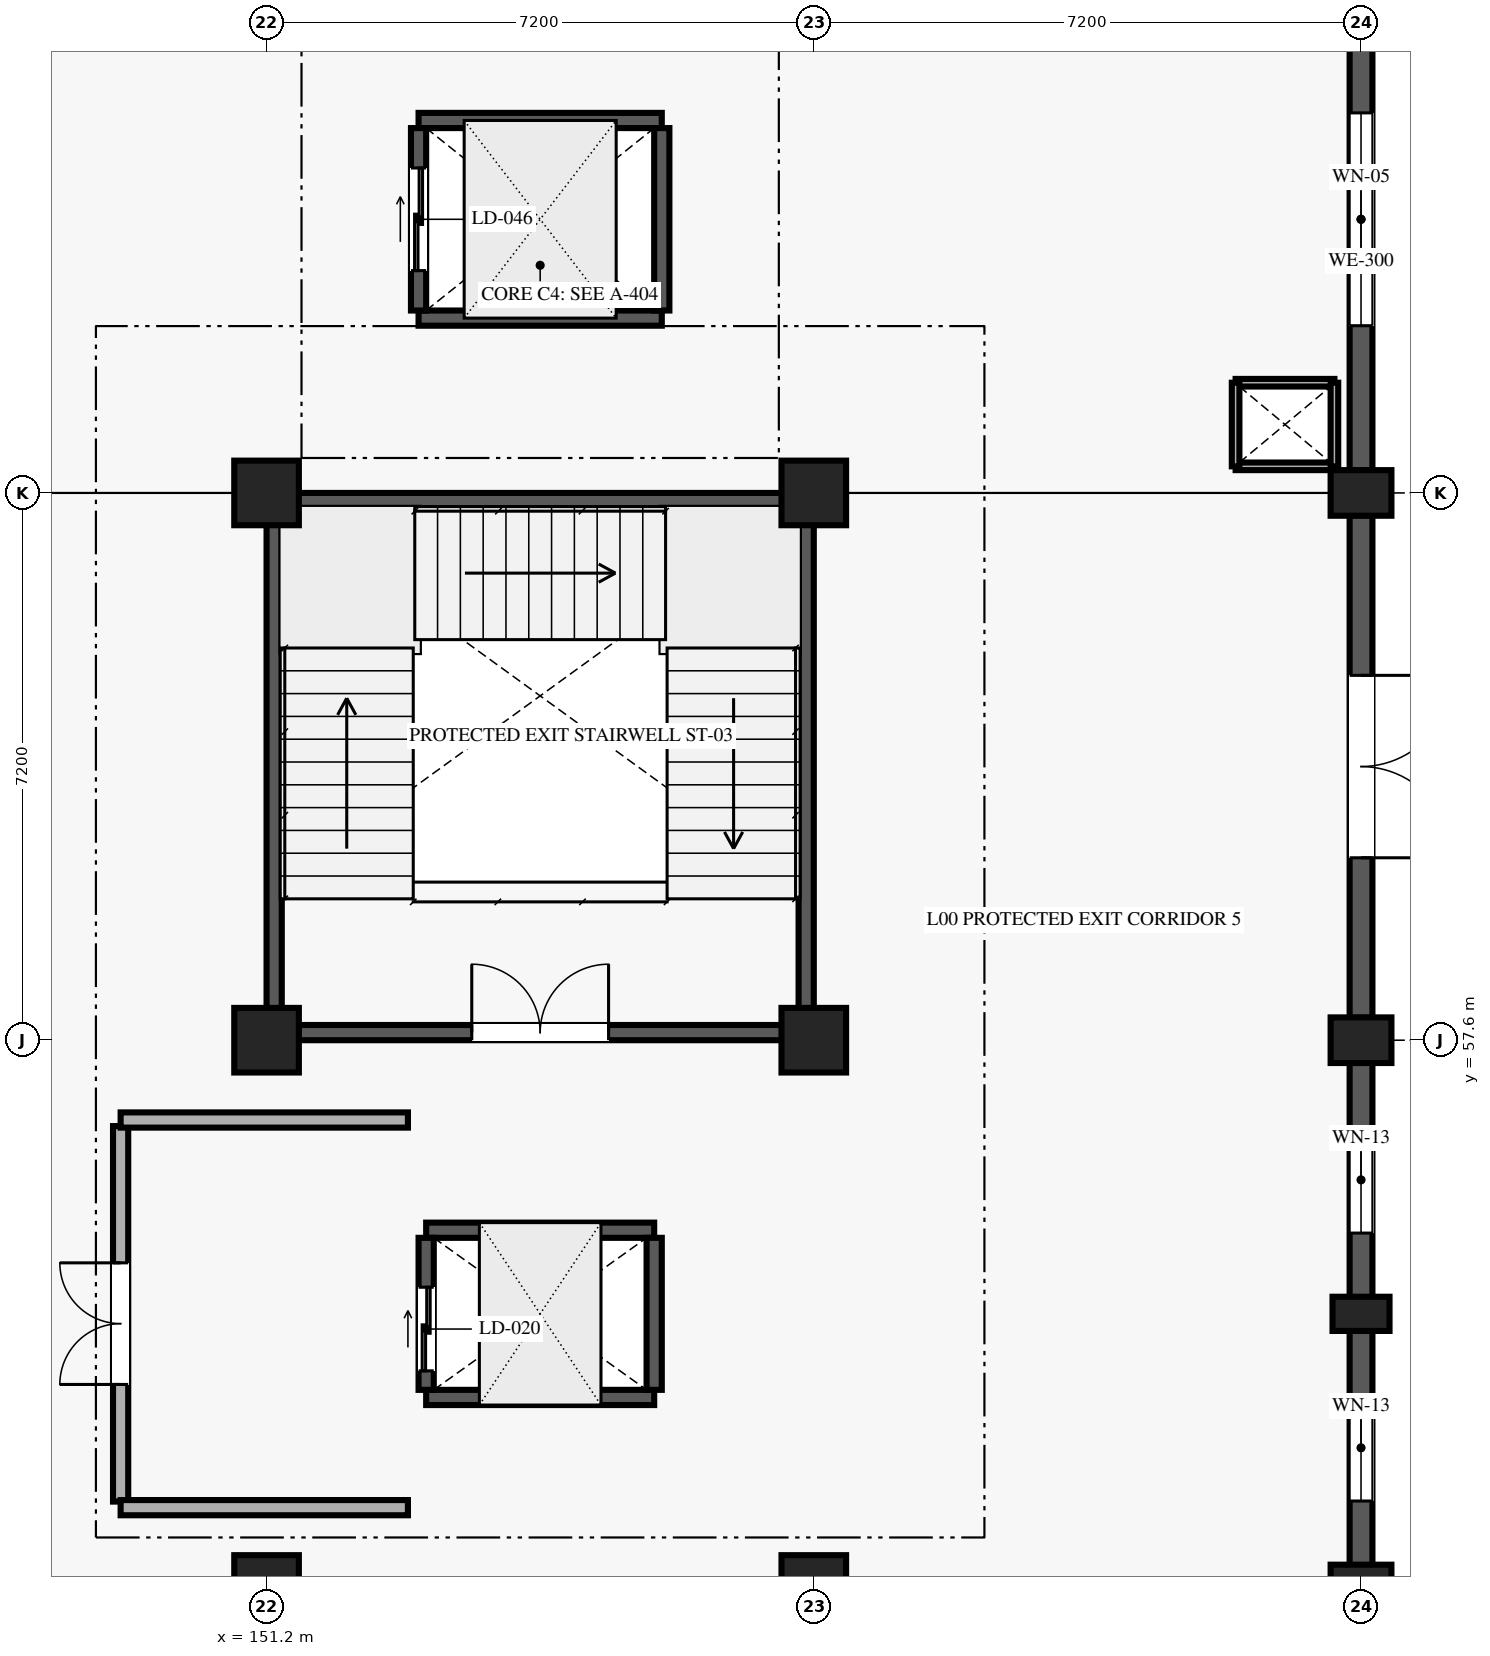
"""IFC4 building model, lengths in metres.
Left out: names, types, materials, properties, quantities, classifications, styles, units other than length and angle.
Written with IfcOpenShell. Run it as: python <this file> out.ifc"""

import sys

from ifc_helpers import new_model, si_unit, direction, frame, frame_2d, origin, origin_2d, place, context, subcontext, project, spatial, rectangle, extrude, element, fill, save


model = new_model("IFC4")
c1 = context("Model", 3, precision=1e-05, world=origin(), true_north=direction((0.0, 1.0)))
c2 = subcontext(c1, "Body", "Model", "MODEL_VIEW")
j1 = project(units=[si_unit("LENGTHUNIT", "METRE"), si_unit("PLANEANGLEUNIT", "RADIAN")], contexts=[c1])
p1 = place(None, origin())
s1 = spatial("IfcSite", under=j1, at=p1, CompositionType="ELEMENT")
p2 = place(p1, origin())
s2 = spatial("IfcBuilding", under=s1, at=p2, CompositionType="ELEMENT")
p3 = place(p2, origin())
s3 = spatial("IfcBuildingStorey", under=s2, at=p3, CompositionType="ELEMENT", Elevation=0.0)
for number, where, z_axis, x_axis in (
    (1, (151.2, 50.4, 0.0), (0.0, 0.0, 1.0), (1.0, 0.0, 0.0)),
    (2, (151.2, 57.6, 0.0), (0.0, 0.0, 1.0), (1.0, 0.0, 0.0)),
    (3, (151.2, 64.8, 0.0), (0.0, 0.0, 1.0), (1.0, 0.0, 0.0)),
    (4, (158.4, 50.4, 0.0), (0.0, 0.0, 1.0), (1.0, 0.0, 0.0)),
    (5, (158.4, 57.6, 0.0), (0.0, 0.0, 1.0), (1.0, 0.0, 0.0)),
    (6, (158.4, 64.8, 0.0), (0.0, 0.0, 1.0), (1.0, 0.0, 0.0)),
):
    element("IfcColumn", number, at=place(p3, frame(where, z_axis=z_axis, x_axis=x_axis)), inside=s3, PredefinedType="COLUMN", context=c2, shape_type="SweptSolid", body=[
        extrude(rectangle(XDim=0.85, YDim=0.85, at=origin_2d()), origin(), (0.0, 0.0, 1.0), 5.4),
    ])
for number, where, z_axis, x_axis in (
    (7, (165.6, 50.4, 0.0), (0.0, 0.0, 1.0), (0.0, 1.0, 0.0)),
    (8, (165.6, 57.6, 0.0), (0.0, 0.0, 1.0), (0.0, 1.0, 0.0)),
    (9, (165.6, 64.8, 0.0), (0.0, 0.0, 1.0), (0.0, 1.0, 0.0)),
):
    element("IfcColumn", number, at=place(p3, frame(where, z_axis=z_axis, x_axis=x_axis)), inside=s3, PredefinedType="COLUMN", context=c2, shape_type="SweptSolid", body=[
        extrude(rectangle(XDim=0.6, YDim=0.8, at=origin_2d()), origin(), (0.0, 0.0, 1.0), 5.4),
    ])
p4 = place(p3, frame((165.6, 54.0, 0.0), z_axis=(0.0, 0.0, 1.0), x_axis=(0.0, 1.0, 0.0)))
e10 = element("IfcColumn", 10, at=p4, inside=s3, PredefinedType="PILASTER", context=c2, shape_type="SweptSolid", body=[
    extrude(rectangle(XDim=0.45, YDim=0.75, at=origin_2d()), origin(), (0.0, 0.0, 1.0), 5.4),
])
p5 = place(p3, frame((165.6, 50.695, 0.0), z_axis=(0.0, 0.0, 1.0), x_axis=(0.0, 1.0, 0.0)))
e11 = element("IfcWall", 11, at=p5, inside=s3, PredefinedType="SOLIDWALL", context=c2, shape_type="SweptSolid", body=[
    extrude(rectangle(XDim=3.085, YDim=0.3, at=frame_2d((1.542, 0.0))), origin(), (0.0, 0.0, 1.0), 5.16),
])
p6 = place(p5, frame((0.843, 0.0, 0.85)))
e12 = element("IfcOpeningElement", 12, at=p6, cuts=e11, PredefinedType="OPENING", context=c2, shape_type="SweptSolid", body=[
    extrude(rectangle(XDim=1.4, YDim=1.6, at=frame_2d((0.7, 0.8))), frame((0.0, 0.16, 0.0), z_axis=(0.0, -1.0, 0.0), x_axis=(1.0, 0.0, 0.0)), (0.0, 0.0, 1.0), 0.32),
])
p7 = place(p3, frame((165.6, 54.22, 0.0), z_axis=(0.0, 0.0, 1.0), x_axis=(0.0, 1.0, 0.0)))
e13 = element("IfcWall", 13, at=p7, inside=s3, PredefinedType="SOLIDWALL", context=c2, shape_type="SweptSolid", body=[
    extrude(rectangle(XDim=3.085, YDim=0.3, at=frame_2d((1.542, 0.0))), origin(), (0.0, 0.0, 1.0), 5.16),
])
p8 = place(p7, frame((0.843, 0.0, 0.85)))
e14 = element("IfcOpeningElement", 14, at=p8, cuts=e13, PredefinedType="OPENING", context=c2, shape_type="SweptSolid", body=[
    extrude(rectangle(XDim=1.4, YDim=1.6, at=frame_2d((0.7, 0.8))), frame((0.0, 0.16, 0.0), z_axis=(0.0, -1.0, 0.0), x_axis=(1.0, 0.0, 0.0)), (0.0, 0.0, 1.0), 0.32),
])
p9 = place(p3, frame((165.6, 64.505, 0.0), z_axis=(0.0, 0.0, 1.0), x_axis=(0.0, -1.0, 0.0)))
e15 = element("IfcWall", 15, at=p9, inside=s3, PredefinedType="SOLIDWALL", context=c2, shape_type="SweptSolid", body=[
    extrude(rectangle(XDim=6.61, YDim=0.3, at=frame_2d((3.305, 0.0))), origin(), (0.0, 0.0, 1.0), 5.16),
])
p10 = place(p9, frame((2.105, 0.0, 0.0)))
e16 = element("IfcOpeningElement", 16, at=p10, cuts=e15, PredefinedType="OPENING", context=c2, shape_type="SweptSolid", body=[
    extrude(rectangle(XDim=2.4, YDim=2.6, at=frame_2d((1.2, 1.3))), frame((0.0, 0.16, 0.0), z_axis=(0.0, -1.0, 0.0), x_axis=(1.0, 0.0, 0.0)), (0.0, 0.0, 1.0), 0.32),
])
p11 = place(p3, frame((165.6, 65.095, 0.0), z_axis=(0.0, 0.0, 1.0), x_axis=(0.0, 1.0, 0.0)))
e17 = element("IfcWall", 17, at=p11, inside=s3, PredefinedType="SOLIDWALL", context=c2, shape_type="SweptSolid", body=[
    extrude(rectangle(XDim=6.61, YDim=0.3, at=frame_2d((3.305, 0.0))), origin(), (0.0, 0.0, 1.0), 5.16),
])
p12 = place(p11, frame((1.905, 0.0, 0.85)))
e18 = element("IfcOpeningElement", 18, at=p12, cuts=e17, PredefinedType="OPENING", context=c2, shape_type="SweptSolid", body=[
    extrude(rectangle(XDim=2.8, YDim=1.85, at=frame_2d((1.4, 0.925))), frame((0.0, 0.16, 0.0), z_axis=(0.0, -1.0, 0.0), x_axis=(1.0, 0.0, 0.0)), (0.0, 0.0, 1.0), 0.32),
])
p13 = place(p3, frame((151.4, 57.7, 0.0), z_axis=(0.0, 0.0, 1.0), x_axis=(1.0, 0.0, 0.0)))
e19 = element("IfcWall", 19, at=p13, inside=s3, PredefinedType="SHEAR", context=c2, shape_type="SweptSolid", body=[
    extrude(rectangle(XDim=6.8, YDim=0.2, at=frame_2d((3.4, 0.0))), origin(), (0.0, 0.0, 1.0), 5.16),
])
p14 = place(p13, frame((2.5, 0.0, 0.0)))
e20 = element("IfcOpeningElement", 20, at=p14, cuts=e19, PredefinedType="OPENING", context=c2, shape_type="SweptSolid", body=[
    extrude(rectangle(XDim=1.8, YDim=2.2, at=frame_2d((0.9, 1.1))), frame((0.0, 0.11, 0.0), z_axis=(0.0, -1.0, 0.0), x_axis=(1.0, 0.0, 0.0)), (0.0, 0.0, 1.0), 0.22),
])
for number, where, z_axis, x_axis in (
    (21, (151.4, 64.7, 0.0), (0.0, 0.0, 1.0), (1.0, 0.0, 0.0)),
    (22, (151.3, 57.8, 0.0), (0.0, 0.0, 1.0), (0.0, 1.0, 0.0)),
    (23, (158.3, 57.8, 0.0), (0.0, 0.0, 1.0), (0.0, 1.0, 0.0)),
):
    element("IfcWall", number, at=place(p3, frame(where, z_axis=z_axis, x_axis=x_axis)), inside=s3, PredefinedType="SHEAR", context=c2, shape_type="SweptSolid", body=[
        extrude(rectangle(XDim=6.8, YDim=0.2, at=frame_2d((3.4, 0.0))), origin(), (0.0, 0.0, 1.0), 5.16),
    ])
for number, where, z_axis, x_axis in (
    (24, (153.3, 52.9, 0.0), (0.0, 0.0, 1.0), (1.0, 0.0, 0.0)),
    (25, (153.3, 55.1, 0.0), (0.0, 0.0, 1.0), (1.0, 0.0, 0.0)),
):
    element("IfcWall", number, at=place(p3, frame(where, z_axis=z_axis, x_axis=x_axis)), inside=s3, PredefinedType="SHEAR", context=c2, shape_type="SweptSolid", body=[
        extrude(rectangle(XDim=3.0, YDim=0.2, at=frame_2d((1.5, 0.0))), origin(), (0.0, 0.0, 1.0), 5.16),
    ])
p15 = place(p3, frame((153.3, 53.0, 0.0), z_axis=(0.0, 0.0, 1.0), x_axis=(0.0, 1.0, 0.0)))
e26 = element("IfcWall", 26, at=p15, inside=s3, PredefinedType="SHEAR", context=c2, shape_type="SweptSolid", body=[
    extrude(rectangle(XDim=2.0, YDim=0.2, at=frame_2d((1.0, 0.0))), origin(), (0.0, 0.0, 1.0), 5.16),
])
p16 = place(p15, frame((0.25, 0.0, 0.0)))
e27 = element("IfcOpeningElement", 27, at=p16, cuts=e26, PredefinedType="OPENING", context=c2, shape_type="SweptSolid", body=[
    extrude(rectangle(XDim=1.1, YDim=2.15, at=frame_2d((0.55, 1.075))), frame((0.0, 0.11, 0.0), z_axis=(0.0, -1.0, 0.0), x_axis=(1.0, 0.0, 0.0)), (0.0, 0.0, 1.0), 0.22),
])
p17 = place(p3, frame((156.3, 53.0, 0.0), z_axis=(0.0, 0.0, 1.0), x_axis=(0.0, 1.0, 0.0)))
e28 = element("IfcWall", 28, at=p17, inside=s3, PredefinedType="SHEAR", context=c2, shape_type="SweptSolid", body=[
    extrude(rectangle(XDim=2.0, YDim=0.2, at=frame_2d((1.0, 0.0))), origin(), (0.0, 0.0, 1.0), 5.16),
])
for number, where, z_axis, x_axis in (
    (29, (153.2, 67.1, 0.0), (0.0, 0.0, 1.0), (1.0, 0.0, 0.0)),
    (30, (153.2, 69.7, 0.0), (0.0, 0.0, 1.0), (1.0, 0.0, 0.0)),
):
    element("IfcWall", number, at=place(p3, frame(where, z_axis=z_axis, x_axis=x_axis)), inside=s3, PredefinedType="SHEAR", context=c2, shape_type="SweptSolid", body=[
        extrude(rectangle(XDim=3.2, YDim=0.2, at=frame_2d((1.6, 0.0))), origin(), (0.0, 0.0, 1.0), 5.16),
    ])
p18 = place(p3, frame((153.2, 67.2, 0.0), z_axis=(0.0, 0.0, 1.0), x_axis=(0.0, 1.0, 0.0)))
e31 = element("IfcWall", 31, at=p18, inside=s3, PredefinedType="SHEAR", context=c2, shape_type="SweptSolid", body=[
    extrude(rectangle(XDim=2.4, YDim=0.2, at=frame_2d((1.2, 0.0))), origin(), (0.0, 0.0, 1.0), 5.16),
])
p19 = place(p18, frame((0.525, 0.0, 0.0)))
e32 = element("IfcOpeningElement", 32, at=p19, cuts=e31, PredefinedType="OPENING", context=c2, shape_type="SweptSolid", body=[
    extrude(rectangle(XDim=1.35, YDim=2.2, at=frame_2d((0.675, 1.1))), frame((0.0, 0.11, 0.0), z_axis=(0.0, -1.0, 0.0), x_axis=(1.0, 0.0, 0.0)), (0.0, 0.0, 1.0), 0.22),
])
p20 = place(p3, frame((156.4, 67.2, 0.0), z_axis=(0.0, 0.0, 1.0), x_axis=(0.0, 1.0, 0.0)))
e33 = element("IfcWall", 33, at=p20, inside=s3, PredefinedType="SHEAR", context=c2, shape_type="SweptSolid", body=[
    extrude(rectangle(XDim=2.4, YDim=0.2, at=frame_2d((1.2, 0.0))), origin(), (0.0, 0.0, 1.0), 5.16),
])
p21 = place(p3, frame((163.95, 65.15, 0.0), z_axis=(0.0, 0.0, 1.0), x_axis=(1.0, 0.0, 0.0)))
e34 = element("IfcWall", 34, at=p21, inside=s3, PredefinedType="PARTITIONING", context=c2, shape_type="SweptSolid", body=[
    extrude(rectangle(XDim=1.3, YDim=0.1, at=frame_2d((0.65, 0.0))), origin(), (0.0, 0.0, 1.0), 4.5),
])
p22 = place(p3, frame((163.95, 66.25, 0.0), z_axis=(0.0, 0.0, 1.0), x_axis=(1.0, 0.0, 0.0)))
e35 = element("IfcWall", 35, at=p22, inside=s3, PredefinedType="PARTITIONING", context=c2, shape_type="SweptSolid", body=[
    extrude(rectangle(XDim=1.3, YDim=0.1, at=frame_2d((0.65, 0.0))), origin(), (0.0, 0.0, 1.0), 5.16),
])
p23 = place(p3, frame((163.95, 65.15, 0.0), z_axis=(0.0, 0.0, 1.0), x_axis=(0.0, 1.0, 0.0)))
e36 = element("IfcWall", 36, at=p23, inside=s3, PredefinedType="PARTITIONING", context=c2, shape_type="SweptSolid", body=[
    extrude(rectangle(XDim=1.1, YDim=0.1, at=frame_2d((0.55, 0.0))), origin(), (0.0, 0.0, 1.0), 5.16),
])
p24 = place(p3, frame((165.25, 65.15, 0.0), z_axis=(0.0, 0.0, 1.0), x_axis=(0.0, 1.0, 0.0)))
e37 = element("IfcWall", 37, at=p24, inside=s3, PredefinedType="PARTITIONING", context=c2, shape_type="SweptSolid", body=[
    extrude(rectangle(XDim=1.1, YDim=0.1, at=frame_2d((0.55, 0.0))), origin(), (0.0, 0.0, 1.0), 4.45),
])
p25 = place(p3, frame((149.28, 51.53, 0.0), z_axis=(0.0, 0.0, 1.0), x_axis=(0.0, 1.0, 0.0)))
e38 = element("IfcWall", 38, at=p25, inside=s3, PredefinedType="SOLIDWALL", context=c2, shape_type="SweptSolid", body=[
    extrude(rectangle(XDim=4.94, YDim=0.2, at=frame_2d((2.47, 0.0))), origin(), (0.0, 0.0, 1.0), 5.16),
])
p26 = place(p25, frame((1.541, 0.0, 0.0)))
e39 = element("IfcOpeningElement", 39, at=p26, cuts=e38, PredefinedType="OPENING", context=c2, shape_type="SweptSolid", body=[
    extrude(rectangle(XDim=1.6, YDim=2.2, at=frame_2d((0.8, 1.1))), frame((0.0, 0.11, 0.0), z_axis=(0.0, -1.0, 0.0), x_axis=(1.0, 0.0, 0.0)), (0.0, 0.0, 1.0), 0.22),
])
for number, where, z_axis, x_axis in (
    (40, (149.28, 51.45, 0.0), (0.0, 0.0, 1.0), (1.0, 0.0, 0.0)),
    (41, (149.28, 56.55, 0.0), (0.0, 0.0, 1.0), (1.0, 0.0, 0.0)),
):
    element("IfcWall", number, at=place(p3, frame(where, z_axis=z_axis, x_axis=x_axis)), inside=s3, PredefinedType="SOLIDWALL", context=c2, shape_type="SweptSolid", body=[
        extrude(rectangle(XDim=3.78, YDim=0.2, at=frame_2d((1.89, 0.0))), origin(), (0.0, 0.0, 1.0), 5.16),
    ])
p27 = place(p6, origin())
e42 = element("IfcWindow", 42, at=p27, inside=s3, PartitioningType="SINGLE_PANEL", PredefinedType="WINDOW", context=c2, shape_type="SweptSolid", body=[
    extrude(rectangle(XDim=1.4, YDim=1.6, at=frame_2d((0.7, 0.8))), frame((0.0, 0.03, 0.0), z_axis=(0.0, -1.0, 0.0), x_axis=(1.0, 0.0, 0.0)), (0.0, 0.0, 1.0), 0.06),
])
fill(e12, e42)
p28 = place(p8, origin())
e43 = element("IfcWindow", 43, at=p28, inside=s3, PartitioningType="SINGLE_PANEL", PredefinedType="WINDOW", context=c2, shape_type="SweptSolid", body=[
    extrude(rectangle(XDim=1.4, YDim=1.6, at=frame_2d((0.7, 0.8))), frame((0.0, 0.03, 0.0), z_axis=(0.0, -1.0, 0.0), x_axis=(1.0, 0.0, 0.0)), (0.0, 0.0, 1.0), 0.06),
])
fill(e14, e43)
p29 = place(p10, origin())
e44 = element("IfcDoor", 44, at=p29, inside=s3, OperationType="DOUBLE_DOOR_SINGLE_SWING", PredefinedType="DOOR", context=c2, shape_type="SweptSolid", body=[
    extrude(rectangle(XDim=2.4, YDim=2.6, at=frame_2d((1.2, 1.3))), frame((0.0, 0.025, 0.0), z_axis=(0.0, -1.0, 0.0), x_axis=(1.0, 0.0, 0.0)), (0.0, 0.0, 1.0), 0.05),
])
fill(e16, e44)
p30 = place(p12, origin())
e45 = element("IfcWindow", 45, at=p30, inside=s3, PartitioningType="SINGLE_PANEL", PredefinedType="WINDOW", context=c2, shape_type="SweptSolid", body=[
    extrude(rectangle(XDim=2.8, YDim=1.85, at=frame_2d((1.4, 0.925))), frame((0.0, 0.03, 0.0), z_axis=(0.0, -1.0, 0.0), x_axis=(1.0, 0.0, 0.0)), (0.0, 0.0, 1.0), 0.06),
])
fill(e18, e45)
p31 = place(p14, origin())
e46 = element("IfcDoor", 46, at=p31, inside=s3, OperationType="DOUBLE_DOOR_SINGLE_SWING", PredefinedType="DOOR", context=c2, shape_type="SweptSolid", body=[
    extrude(rectangle(XDim=1.8, YDim=2.2, at=frame_2d((0.9, 1.1))), frame((0.0, 0.025, 0.0), z_axis=(0.0, -1.0, 0.0), x_axis=(1.0, 0.0, 0.0)), (0.0, 0.0, 1.0), 0.05),
])
fill(e20, e46)
p32 = place(p16, origin())
e47 = element("IfcDoor", 47, at=p32, inside=s3, OperationType="DOUBLE_DOOR_SLIDING", PredefinedType="DOOR", context=c2, shape_type="SweptSolid", body=[
    extrude(rectangle(XDim=1.1, YDim=2.15, at=frame_2d((0.55, 1.075))), frame((0.0, 0.025, 0.0), z_axis=(0.0, -1.0, 0.0), x_axis=(1.0, 0.0, 0.0)), (0.0, 0.0, 1.0), 0.05),
])
fill(e27, e47)
p33 = place(p19, origin())
e48 = element("IfcDoor", 48, at=p33, inside=s3, OperationType="DOUBLE_DOOR_SLIDING", PredefinedType="DOOR", context=c2, shape_type="SweptSolid", body=[
    extrude(rectangle(XDim=1.35, YDim=2.2, at=frame_2d((0.675, 1.1))), frame((0.0, 0.025, 0.0), z_axis=(0.0, -1.0, 0.0), x_axis=(1.0, 0.0, 0.0)), (0.0, 0.0, 1.0), 0.05),
])
fill(e32, e48)
p34 = place(p26, origin())
e49 = element("IfcDoor", 49, at=p34, inside=s3, OperationType="DOUBLE_DOOR_SINGLE_SWING", PredefinedType="DOOR", context=c2, shape_type="SweptSolid", body=[
    extrude(rectangle(XDim=1.6, YDim=2.2, at=frame_2d((0.8, 1.1))), frame((0.0, 0.025, 0.0), z_axis=(0.0, -1.0, 0.0), x_axis=(1.0, 0.0, 0.0)), (0.0, 0.0, 1.0), 0.05),
])
fill(e39, e49)
save(model, sys.argv[1])
